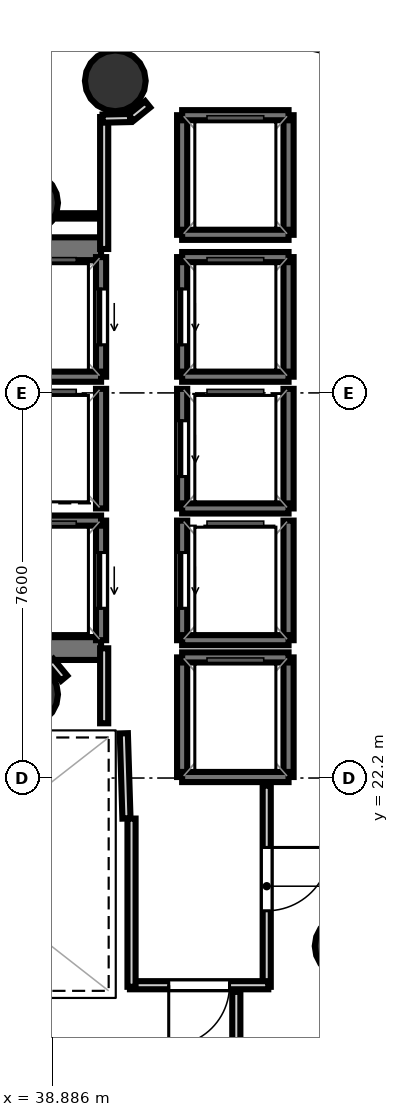
"""IFC4 building model, lengths in metres.
Left out: names, types, materials, properties, quantities, classifications, styles, units other than length and angle.
Written with IfcOpenShell. Run it as: python <this file> out.ifc"""

import sys

from ifc_helpers import new_model, si_unit, direction, frame, frame_2d, origin, origin_2d, place, context, subcontext, project, spatial, rectangle, hollow_circle, extrude, element, fill, save


model = new_model("IFC4")
c1 = context("Model", 3, precision=1e-05, world=origin(), true_north=direction((0.0, 1.0)))
c2 = subcontext(c1, "Body", "Model", "MODEL_VIEW")
j1 = project(units=[si_unit("LENGTHUNIT", "METRE"), si_unit("PLANEANGLEUNIT", "RADIAN")], contexts=[c1])
p1 = place(None, origin())
s1 = spatial("IfcSite", under=j1, at=p1, CompositionType="ELEMENT")
p2 = place(p1, origin())
s2 = spatial("IfcBuilding", under=s1, at=p2, CompositionType="ELEMENT")
p3 = place(p2, frame((0.0, 0.0, 200.3)))
s3 = spatial("IfcBuildingStorey", under=s2, at=p3, CompositionType="ELEMENT", Elevation=200.3)
p4 = place(p3, frame((29.33, 32.645, 0.0), z_axis=(0.0, 0.0, 1.0), x_axis=(1.0, 0.0, 0.0)))
e1 = element("IfcWall", 1, at=p4, inside=s3, PredefinedType="SHEAR", context=c2, shape_type="SweptSolid", body=[
    extrude(rectangle(XDim=10.52, YDim=0.45, at=frame_2d((5.26, 0.0))), origin(), (0.0, 0.0, 1.0), 3.52),
])
p5 = place(p4, frame((0.895, 0.0, 0.0)))
e2 = element("IfcOpeningElement", 2, at=p5, cuts=e1, PredefinedType="OPENING", context=c2, shape_type="SweptSolid", body=[
    extrude(rectangle(XDim=1.25, YDim=2.15, at=frame_2d((0.625, 1.075))), frame((0.0, 0.235, 0.0), z_axis=(0.0, -1.0, 0.0), x_axis=(1.0, 0.0, 0.0)), (0.0, 0.0, 1.0), 0.47),
])
p6 = place(p3, frame((29.33, 24.755, 0.0), z_axis=(0.0, 0.0, 1.0), x_axis=(1.0, 0.0, 0.0)))
e3 = element("IfcWall", 3, at=p6, inside=s3, PredefinedType="SHEAR", context=c2, shape_type="SweptSolid", body=[
    extrude(rectangle(XDim=10.52, YDim=0.45, at=frame_2d((5.26, 0.0))), origin(), (0.0, 0.0, 1.0), 3.52),
])
p7 = place(p6, frame((0.695, 0.0, 0.0)))
e4 = element("IfcOpeningElement", 4, at=p7, cuts=e3, PredefinedType="OPENING", context=c2, shape_type="SweptSolid", body=[
    extrude(rectangle(XDim=1.25, YDim=2.15, at=frame_2d((0.625, 1.075))), frame((0.0, 0.235, 0.0), z_axis=(0.0, -1.0, 0.0), x_axis=(1.0, 0.0, 0.0)), (0.0, 0.0, 1.0), 0.47),
])
for number, where, z_axis, x_axis in (
    (5, (38.4, 33.55, 0.0), (0.0, 0.0, 1.0), (1.0, 0.0, 0.0)),
    (6, (38.4, 23.85, 0.0), (0.0, 0.0, 1.0), (1.0, 0.0, 0.0)),
    (7, (40.131, 35.958, 0.0), (0.0, 0.0, 1.0), (1.0, 0.0, 0.0)),
    (8, (44.667, 18.883, 0.0), (0.0, 0.0, 1.0), (1.0, 0.0, 0.0)),
):
    element("IfcColumn", number, at=place(p3, frame(where, z_axis=z_axis, x_axis=x_axis)), inside=s3, PredefinedType="COLUMN", context=c2, shape_type="SweptSolid", body=[
        extrude(hollow_circle(Radius=0.6, WallThickness=0.03, at=origin_2d()), origin(), (0.0, 0.0, 1.0), 3.7),
    ])
p8 = place(p3, frame((39.85, 30.12, 0.0), z_axis=(0.0, 0.0, 1.0), x_axis=(0.0, 1.0, 0.0)))
e9 = element("IfcWall", 9, at=p8, inside=s3, PredefinedType="SOLIDWALL", context=c2, shape_type="SweptSolid", body=[
    extrude(rectangle(XDim=2.36, YDim=0.2, at=frame_2d((1.18, 0.0))), origin(), (0.0, 0.0, 1.0), 3.52),
])
p9 = place(p8, frame((0.63, 0.0, 0.0)))
e10 = element("IfcOpeningElement", 10, at=p9, cuts=e9, PredefinedType="OPENING", context=c2, shape_type="SweptSolid", body=[
    extrude(rectangle(XDim=1.1, YDim=2.15, at=frame_2d((0.55, 1.075))), frame((0.0, 0.11, 0.0), z_axis=(0.0, -1.0, 0.0), x_axis=(1.0, 0.0, 0.0)), (0.0, 0.0, 1.0), 0.22),
])
p10 = place(p3, frame((37.75, 30.12, 0.0), z_axis=(0.0, 0.0, 1.0), x_axis=(1.0, 0.0, 0.0)))
e11 = element("IfcWall", 11, at=p10, inside=s3, PredefinedType="SOLIDWALL", context=c2, shape_type="SweptSolid", body=[
    extrude(rectangle(XDim=2.1, YDim=0.2, at=frame_2d((1.05, 0.0))), origin(), (0.0, 0.0, 1.0), 3.52),
])
p11 = place(p3, frame((39.85, 24.92, 0.0), z_axis=(0.0, 0.0, 1.0), x_axis=(0.0, 1.0, 0.0)))
e12 = element("IfcWall", 12, at=p11, inside=s3, PredefinedType="SOLIDWALL", context=c2, shape_type="SweptSolid", body=[
    extrude(rectangle(XDim=2.36, YDim=0.2, at=frame_2d((1.18, 0.0))), origin(), (0.0, 0.0, 1.0), 3.52),
])
p12 = place(p11, frame((0.63, 0.0, 0.0)))
e13 = element("IfcOpeningElement", 13, at=p12, cuts=e12, PredefinedType="OPENING", context=c2, shape_type="SweptSolid", body=[
    extrude(rectangle(XDim=1.1, YDim=2.15, at=frame_2d((0.55, 1.075))), frame((0.0, 0.11, 0.0), z_axis=(0.0, -1.0, 0.0), x_axis=(1.0, 0.0, 0.0)), (0.0, 0.0, 1.0), 0.22),
])
p13 = place(p3, frame((37.75, 27.28, 0.0), z_axis=(0.0, 0.0, 1.0), x_axis=(1.0, 0.0, 0.0)))
e14 = element("IfcWall", 14, at=p13, inside=s3, PredefinedType="SOLIDWALL", context=c2, shape_type="SweptSolid", body=[
    extrude(rectangle(XDim=2.1, YDim=0.2, at=frame_2d((1.05, 0.0))), origin(), (0.0, 0.0, 1.0), 3.52),
])
p14 = place(p3, frame((43.55, 30.12, 0.0), z_axis=(0.0, 0.0, 1.0), x_axis=(0.0, 1.0, 0.0)))
e15 = element("IfcWall", 15, at=p14, inside=s3, PredefinedType="SOLIDWALL", context=c2, shape_type="SweptSolid", body=[
    extrude(rectangle(XDim=2.36, YDim=0.2, at=frame_2d((1.18, 0.0))), origin(), (0.0, 0.0, 1.0), 3.52),
])
p15 = place(p3, frame((41.45, 30.12, 0.0), z_axis=(0.0, 0.0, 1.0), x_axis=(0.0, 1.0, 0.0)))
e16 = element("IfcWall", 16, at=p15, inside=s3, PredefinedType="SOLIDWALL", context=c2, shape_type="SweptSolid", body=[
    extrude(rectangle(XDim=2.36, YDim=0.2, at=frame_2d((1.18, 0.0))), origin(), (0.0, 0.0, 1.0), 3.52),
])
p16 = place(p15, frame((0.63, 0.0, 0.0)))
e17 = element("IfcOpeningElement", 17, at=p16, cuts=e16, PredefinedType="OPENING", context=c2, shape_type="SweptSolid", body=[
    extrude(rectangle(XDim=1.1, YDim=2.15, at=frame_2d((0.55, 1.075))), frame((0.0, 0.11, 0.0), z_axis=(0.0, -1.0, 0.0), x_axis=(1.0, 0.0, 0.0)), (0.0, 0.0, 1.0), 0.22),
])
for number, where, z_axis, x_axis in (
    (18, (41.45, 32.48, 0.0), (0.0, 0.0, 1.0), (1.0, 0.0, 0.0)),
    (19, (41.45, 30.12, 0.0), (0.0, 0.0, 1.0), (1.0, 0.0, 0.0)),
):
    element("IfcWall", number, at=place(p3, frame(where, z_axis=z_axis, x_axis=x_axis)), inside=s3, PredefinedType="SOLIDWALL", context=c2, shape_type="SweptSolid", body=[
        extrude(rectangle(XDim=2.1, YDim=0.2, at=frame_2d((1.05, 0.0))), origin(), (0.0, 0.0, 1.0), 3.52),
    ])
p17 = place(p3, frame((43.55, 27.52, 0.0), z_axis=(0.0, 0.0, 1.0), x_axis=(0.0, 1.0, 0.0)))
e20 = element("IfcWall", 20, at=p17, inside=s3, PredefinedType="SOLIDWALL", context=c2, shape_type="SweptSolid", body=[
    extrude(rectangle(XDim=2.36, YDim=0.2, at=frame_2d((1.18, 0.0))), origin(), (0.0, 0.0, 1.0), 3.52),
])
p18 = place(p3, frame((41.45, 27.52, 0.0), z_axis=(0.0, 0.0, 1.0), x_axis=(0.0, 1.0, 0.0)))
e21 = element("IfcWall", 21, at=p18, inside=s3, PredefinedType="SOLIDWALL", context=c2, shape_type="SweptSolid", body=[
    extrude(rectangle(XDim=2.36, YDim=0.2, at=frame_2d((1.18, 0.0))), origin(), (0.0, 0.0, 1.0), 3.52),
])
p19 = place(p18, frame((0.63, 0.0, 0.0)))
e22 = element("IfcOpeningElement", 22, at=p19, cuts=e21, PredefinedType="OPENING", context=c2, shape_type="SweptSolid", body=[
    extrude(rectangle(XDim=1.1, YDim=2.15, at=frame_2d((0.55, 1.075))), frame((0.0, 0.11, 0.0), z_axis=(0.0, -1.0, 0.0), x_axis=(1.0, 0.0, 0.0)), (0.0, 0.0, 1.0), 0.22),
])
p20 = place(p3, frame((41.45, 27.52, 0.0), z_axis=(0.0, 0.0, 1.0), x_axis=(1.0, 0.0, 0.0)))
e23 = element("IfcWall", 23, at=p20, inside=s3, PredefinedType="SOLIDWALL", context=c2, shape_type="SweptSolid", body=[
    extrude(rectangle(XDim=2.1, YDim=0.2, at=frame_2d((1.05, 0.0))), origin(), (0.0, 0.0, 1.0), 3.52),
])
p21 = place(p3, frame((43.55, 24.92, 0.0), z_axis=(0.0, 0.0, 1.0), x_axis=(0.0, 1.0, 0.0)))
e24 = element("IfcWall", 24, at=p21, inside=s3, PredefinedType="SOLIDWALL", context=c2, shape_type="SweptSolid", body=[
    extrude(rectangle(XDim=2.36, YDim=0.2, at=frame_2d((1.18, 0.0))), origin(), (0.0, 0.0, 1.0), 3.52),
])
p22 = place(p3, frame((41.45, 24.92, 0.0), z_axis=(0.0, 0.0, 1.0), x_axis=(0.0, 1.0, 0.0)))
e25 = element("IfcWall", 25, at=p22, inside=s3, PredefinedType="SOLIDWALL", context=c2, shape_type="SweptSolid", body=[
    extrude(rectangle(XDim=2.36, YDim=0.2, at=frame_2d((1.18, 0.0))), origin(), (0.0, 0.0, 1.0), 3.52),
])
p23 = place(p22, frame((0.63, 0.0, 0.0)))
e26 = element("IfcOpeningElement", 26, at=p23, cuts=e25, PredefinedType="OPENING", context=c2, shape_type="SweptSolid", body=[
    extrude(rectangle(XDim=1.1, YDim=2.15, at=frame_2d((0.55, 1.075))), frame((0.0, 0.11, 0.0), z_axis=(0.0, -1.0, 0.0), x_axis=(1.0, 0.0, 0.0)), (0.0, 0.0, 1.0), 0.22),
])
p24 = place(p3, frame((41.45, 24.92, 0.0), z_axis=(0.0, 0.0, 1.0), x_axis=(1.0, 0.0, 0.0)))
e27 = element("IfcWall", 27, at=p24, inside=s3, PredefinedType="SOLIDWALL", context=c2, shape_type="SweptSolid", body=[
    extrude(rectangle(XDim=2.1, YDim=0.2, at=frame_2d((1.05, 0.0))), origin(), (0.0, 0.0, 1.0), 3.52),
])
p25 = place(p3, frame((39.85, 27.52, 0.0), z_axis=(0.0, 0.0, 1.0), x_axis=(0.0, 1.0, 0.0)))
e28 = element("IfcWall", 28, at=p25, inside=s3, PredefinedType="SOLIDWALL", context=c2, shape_type="SweptSolid", body=[
    extrude(rectangle(XDim=2.36, YDim=0.2, at=frame_2d((1.18, 0.0))), origin(), (0.0, 0.0, 1.0), 3.52),
])
for number, where, z_axis, x_axis in (
    (29, (43.55, 22.22, 0.0), (0.0, 0.0, 1.0), (0.0, 1.0, 0.0)),
    (30, (41.45, 22.22, 0.0), (0.0, 0.0, 1.0), (0.0, 1.0, 0.0)),
):
    element("IfcWall", number, at=place(p3, frame(where, z_axis=z_axis, x_axis=x_axis)), inside=s3, PredefinedType="SOLIDWALL", context=c2, shape_type="SweptSolid", body=[
        extrude(rectangle(XDim=2.36, YDim=0.2, at=frame_2d((1.18, 0.0))), origin(), (0.0, 0.0, 1.0), 3.52),
    ])
for number, where, z_axis, x_axis in (
    (31, (41.45, 24.58, 0.0), (0.0, 0.0, 1.0), (1.0, 0.0, 0.0)),
    (32, (41.45, 22.22, 0.0), (0.0, 0.0, 1.0), (1.0, 0.0, 0.0)),
):
    element("IfcWall", number, at=place(p3, frame(where, z_axis=z_axis, x_axis=x_axis)), inside=s3, PredefinedType="SOLIDWALL", context=c2, shape_type="SweptSolid", body=[
        extrude(rectangle(XDim=2.1, YDim=0.2, at=frame_2d((1.05, 0.0))), origin(), (0.0, 0.0, 1.0), 3.52),
    ])
for number, where, z_axis, x_axis in (
    (33, (43.55, 32.92, 0.0), (0.0, 0.0, 1.0), (0.0, 1.0, 0.0)),
    (34, (41.45, 32.92, 0.0), (0.0, 0.0, 1.0), (0.0, 1.0, 0.0)),
):
    element("IfcWall", number, at=place(p3, frame(where, z_axis=z_axis, x_axis=x_axis)), inside=s3, PredefinedType="SOLIDWALL", context=c2, shape_type="SweptSolid", body=[
        extrude(rectangle(XDim=2.36, YDim=0.2, at=frame_2d((1.18, 0.0))), origin(), (0.0, 0.0, 1.0), 3.52),
    ])
for number, where, z_axis, x_axis in (
    (35, (41.45, 35.28, 0.0), (0.0, 0.0, 1.0), (1.0, 0.0, 0.0)),
    (36, (41.45, 32.92, 0.0), (0.0, 0.0, 1.0), (1.0, 0.0, 0.0)),
):
    element("IfcWall", number, at=place(p3, frame(where, z_axis=z_axis, x_axis=x_axis)), inside=s3, PredefinedType="SOLIDWALL", context=c2, shape_type="SweptSolid", body=[
        extrude(rectangle(XDim=2.1, YDim=0.2, at=frame_2d((1.05, 0.0))), origin(), (0.0, 0.0, 1.0), 3.52),
    ])
p26 = place(p3, frame((40.351, 21.401, 0.0), z_axis=(0.0, 0.0, 1.0), x_axis=(-0.031058045979, 0.999517582527, 0.0)))
e37 = element("IfcWall", 37, at=p26, inside=s3, PredefinedType="PARTITIONING", context=c2, shape_type="SweptSolid", body=[
    extrude(rectangle(XDim=1.682, YDim=0.16, at=frame_2d((0.841, 0.0))), origin(), (0.0, 0.0, 1.0), 2.84),
])
p27 = place(p3, frame((39.911, 23.28, 0.0), z_axis=(0.0, 0.0, 1.0), x_axis=(0.0, 1.0, 0.0)))
e38 = element("IfcWall", 38, at=p27, inside=s3, PredefinedType="PARTITIONING", context=c2, shape_type="SweptSolid", body=[
    extrude(rectangle(XDim=1.48, YDim=0.16, at=frame_2d((0.74, 0.0))), origin(), (0.0, 0.0, 1.0), 2.84),
])
p28 = place(p3, frame((39.911, 32.64, 0.0), z_axis=(0.0, 0.0, 1.0), x_axis=(0.0, 1.0, 0.0)))
e39 = element("IfcWall", 39, at=p28, inside=s3, PredefinedType="PARTITIONING", context=c2, shape_type="SweptSolid", body=[
    extrude(rectangle(XDim=2.604, YDim=0.16, at=frame_2d((1.302, 0.0))), origin(), (0.0, 0.0, 1.0), 2.84),
])
p29 = place(p3, frame((39.881, 35.213, 0.0), z_axis=(0.0, 0.0, 1.0), x_axis=(0.999756500784, 0.02206669754, 0.0)))
e40 = element("IfcWall", 40, at=p29, inside=s3, PredefinedType="PARTITIONING", context=c2, shape_type="SweptSolid", body=[
    extrude(rectangle(XDim=0.542, YDim=0.16, at=frame_2d((0.271, 0.0))), origin(), (0.0, 0.0, 1.0), 2.84),
])
p30 = place(p3, frame((40.441, 35.232, 0.0), z_axis=(0.0, 0.0, 1.0), x_axis=(0.778714564707, 0.627378376033, 0.0)))
e41 = element("IfcWall", 41, at=p30, inside=s3, PredefinedType="PARTITIONING", context=c2, shape_type="SweptSolid", body=[
    extrude(rectangle(XDim=0.421, YDim=0.16, at=frame_2d((0.21, 0.0))), origin(), (0.0, 0.0, 1.0), 2.84),
])
p31 = place(p3, frame((43.119, 22.05, 0.0), z_axis=(0.0, 0.0, 1.0), x_axis=(0.0, -1.0, 0.0)))
e42 = element("IfcWall", 42, at=p31, inside=s3, PredefinedType="PARTITIONING", context=c2, shape_type="SweptSolid", body=[
    extrude(rectangle(XDim=3.97, YDim=0.16, at=frame_2d((1.985, 0.0))), origin(), (0.0, 0.0, 1.0), 2.84),
])
p32 = place(p31, frame((1.22, 0.0, 0.0)))
e43 = element("IfcOpeningElement", 43, at=p32, cuts=e42, PredefinedType="OPENING", context=c2, shape_type="SweptSolid", body=[
    extrude(rectangle(XDim=1.25, YDim=2.2, at=frame_2d((0.625, 1.1))), frame((0.0, 0.09, 0.0), z_axis=(0.0, -1.0, 0.0), x_axis=(1.0, 0.0, 0.0)), (0.0, 0.0, 1.0), 0.18),
])
p33 = place(p3, frame((43.15, 18.111, 0.0), z_axis=(0.0, 0.0, 1.0), x_axis=(-1.0, 0.0, 0.0)))
e44 = element("IfcWall", 44, at=p33, inside=s3, PredefinedType="PARTITIONING", context=c2, shape_type="SweptSolid", body=[
    extrude(rectangle(XDim=2.73, YDim=0.16, at=frame_2d((1.365, 0.0))), origin(), (0.0, 0.0, 1.0), 2.84),
])
p34 = place(p33, frame((0.765, 0.0, 0.0)))
e45 = element("IfcOpeningElement", 45, at=p34, cuts=e44, PredefinedType="OPENING", context=c2, shape_type="SweptSolid", body=[
    extrude(rectangle(XDim=1.2, YDim=2.15, at=frame_2d((0.6, 1.075))), frame((0.0, 0.09, 0.0), z_axis=(0.0, -1.0, 0.0), x_axis=(1.0, 0.0, 0.0)), (0.0, 0.0, 1.0), 0.18),
])
p35 = place(p3, frame((40.451, 18.08, 0.0), z_axis=(0.0, 0.0, 1.0), x_axis=(0.0, 1.0, 0.0)))
e46 = element("IfcWall", 46, at=p35, inside=s3, PredefinedType="PARTITIONING", context=c2, shape_type="SweptSolid", body=[
    extrude(rectangle(XDim=3.32, YDim=0.16, at=frame_2d((1.66, 0.0))), origin(), (0.0, 0.0, 1.0), 2.84),
])
p36 = place(p3, frame((39.121, 24.17, 0.0), z_axis=(0.0, 0.0, 1.0), x_axis=(-0.638008265708, 0.770029514296, 0.0)))
e47 = element("IfcWall", 47, at=p36, inside=s3, PredefinedType="PARTITIONING", context=c2, shape_type="SweptSolid", body=[
    extrude(rectangle(XDim=0.431, YDim=0.16, at=frame_2d((0.215, 0.0))), origin(), (0.0, 0.0, 1.0), 2.84),
])
p37 = place(p3, frame((42.519, 17.98, 0.0), z_axis=(0.0, 0.0, 1.0), x_axis=(0.0, -1.0, 0.0)))
e48 = element("IfcWall", 48, at=p37, inside=s3, PredefinedType="PARTITIONING", context=c2, shape_type="SweptSolid", body=[
    extrude(rectangle(XDim=2.969, YDim=0.16, at=frame_2d((1.485, 0.0))), origin(), (0.0, 0.0, 1.0), 2.84),
])
p38 = place(p3, frame((39.8, 33.293, 0.0), z_axis=(0.0, 0.0, 1.0), x_axis=(-1.0, 0.0, 0.0)))
e49 = element("IfcWall", 49, at=p38, inside=s3, PredefinedType="PARTITIONING", context=c2, shape_type="SweptSolid", body=[
    extrude(rectangle(XDim=2.87, YDim=0.105, at=frame_2d((1.435, 0.0))), origin(), (0.0, 0.0, 1.0), 2.84),
])
p39 = place(p9, origin())
e50 = element("IfcDoor", 50, at=p39, inside=s3, OperationType="SLIDING_TO_LEFT", PredefinedType="DOOR", context=c2, shape_type="SweptSolid", body=[
    extrude(rectangle(XDim=1.1, YDim=2.15, at=frame_2d((0.55, 1.075))), frame((0.0, 0.025, 0.0), z_axis=(0.0, -1.0, 0.0), x_axis=(1.0, 0.0, 0.0)), (0.0, 0.0, 1.0), 0.05),
])
fill(e10, e50)
p40 = place(p12, origin())
e51 = element("IfcDoor", 51, at=p40, inside=s3, OperationType="SLIDING_TO_LEFT", PredefinedType="DOOR", context=c2, shape_type="SweptSolid", body=[
    extrude(rectangle(XDim=1.1, YDim=2.15, at=frame_2d((0.55, 1.075))), frame((0.0, 0.025, 0.0), z_axis=(0.0, -1.0, 0.0), x_axis=(1.0, 0.0, 0.0)), (0.0, 0.0, 1.0), 0.05),
])
fill(e13, e51)
p41 = place(p16, origin())
e52 = element("IfcDoor", 52, at=p41, inside=s3, OperationType="SLIDING_TO_LEFT", PredefinedType="DOOR", context=c2, shape_type="SweptSolid", body=[
    extrude(rectangle(XDim=1.1, YDim=2.15, at=frame_2d((0.55, 1.075))), frame((0.0, 0.025, 0.0), z_axis=(0.0, -1.0, 0.0), x_axis=(1.0, 0.0, 0.0)), (0.0, 0.0, 1.0), 0.05),
])
fill(e17, e52)
p42 = place(p19, origin())
e53 = element("IfcDoor", 53, at=p42, inside=s3, OperationType="SLIDING_TO_LEFT", PredefinedType="DOOR", context=c2, shape_type="SweptSolid", body=[
    extrude(rectangle(XDim=1.1, YDim=2.15, at=frame_2d((0.55, 1.075))), frame((0.0, 0.025, 0.0), z_axis=(0.0, -1.0, 0.0), x_axis=(1.0, 0.0, 0.0)), (0.0, 0.0, 1.0), 0.05),
])
fill(e22, e53)
p43 = place(p23, origin())
e54 = element("IfcDoor", 54, at=p43, inside=s3, OperationType="SLIDING_TO_LEFT", PredefinedType="DOOR", context=c2, shape_type="SweptSolid", body=[
    extrude(rectangle(XDim=1.1, YDim=2.15, at=frame_2d((0.55, 1.075))), frame((0.0, 0.025, 0.0), z_axis=(0.0, -1.0, 0.0), x_axis=(1.0, 0.0, 0.0)), (0.0, 0.0, 1.0), 0.05),
])
fill(e26, e54)
p44 = place(p34, origin())
e55 = element("IfcDoor", 55, at=p44, inside=s3, OperationType="SINGLE_SWING_RIGHT", PredefinedType="DOOR", context=c2, shape_type="SweptSolid", body=[
    extrude(rectangle(XDim=1.2, YDim=2.15, at=frame_2d((0.6, 1.075))), frame((0.0, 0.025, 0.0), z_axis=(0.0, -1.0, 0.0), x_axis=(1.0, 0.0, 0.0)), (0.0, 0.0, 1.0), 0.05),
])
fill(e45, e55)
p45 = place(p32, origin())
e56 = element("IfcDoor", 56, at=p45, inside=s3, OperationType="SINGLE_SWING_LEFT", PredefinedType="DOOR", context=c2, shape_type="SweptSolid", body=[
    extrude(rectangle(XDim=1.25, YDim=2.2, at=frame_2d((0.625, 1.1))), frame((0.0, 0.025, 0.0), z_axis=(0.0, -1.0, 0.0), x_axis=(1.0, 0.0, 0.0)), (0.0, 0.0, 1.0), 0.05),
])
fill(e43, e56)
save(model, sys.argv[1])
